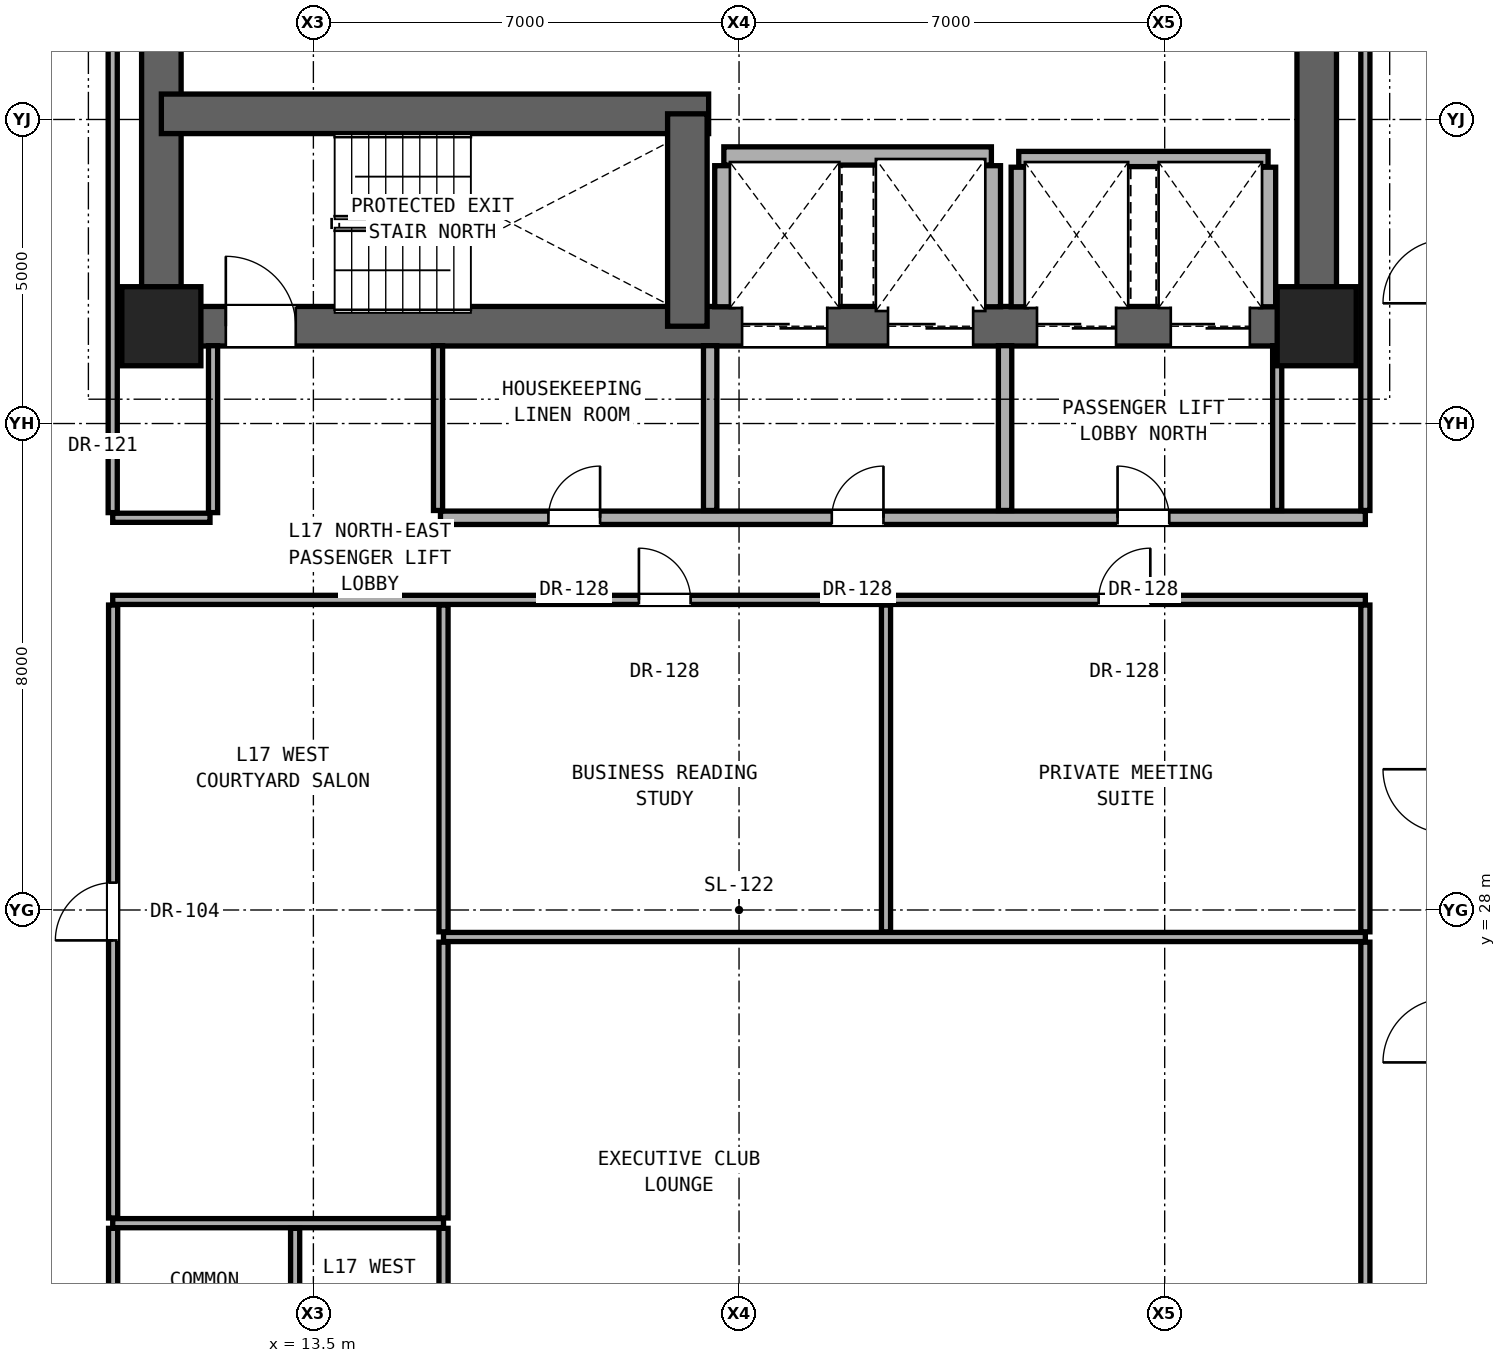
"""IFC4 building model, lengths in metres.
Left out: names, types, materials, properties, quantities, classifications, styles, units other than length and angle.
Written with IfcOpenShell. Run it as: python <this file> out.ifc"""

import sys

from ifc_helpers import new_model, si_unit, direction, frame, frame_2d, origin, origin_2d, place, context, subcontext, project, spatial, rectangle, extrude, element, fill, save


model = new_model("IFC4")
c1 = context("Model", 3, precision=1e-05, world=origin(), true_north=direction((0.0, 1.0)))
c2 = subcontext(c1, "Body", "Model", "MODEL_VIEW")
j1 = project(units=[si_unit("LENGTHUNIT", "METRE"), si_unit("PLANEANGLEUNIT", "RADIAN")], contexts=[c1])
p1 = place(None, origin())
s1 = spatial("IfcSite", under=j1, at=p1, CompositionType="ELEMENT")
p2 = place(p1, origin())
s2 = spatial("IfcBuilding", under=s1, at=p2, CompositionType="ELEMENT")
p3 = place(p2, frame((0.0, 0.0, 62.0)))
s3 = spatial("IfcBuildingStorey", under=s2, at=p3, CompositionType="ELEMENT", Elevation=62.0)
for number, where, z_axis, x_axis in (
    (1, (11.0, 37.6, 0.0), (0.0, 0.0, 1.0), (1.0, 0.0, 0.0)),
    (2, (30.0, 37.6, 0.0), (0.0, 0.0, 1.0), (1.0, 0.0, 0.0)),
):
    element("IfcColumn", number, at=place(p3, frame(where, z_axis=z_axis, x_axis=x_axis)), inside=s3, PredefinedType="COLUMN", context=c2, shape_type="SweptSolid", body=[
        extrude(rectangle(XDim=1.3, YDim=1.3, at=origin_2d()), origin(), (0.0, 0.0, 1.0), 3.3),
    ])
for number, where, z_axis, x_axis in (
    (3, (11.0, 37.6, 0.0), (0.0, 0.0, 1.0), (0.0, 1.0, 0.0)),
    (4, (30.0, 37.6, 0.0), (0.0, 0.0, 1.0), (0.0, 1.0, 0.0)),
):
    element("IfcWall", number, at=place(p3, frame(where, z_axis=z_axis, x_axis=x_axis)), inside=s3, PredefinedType="SHEAR", context=c2, shape_type="SweptSolid", body=[
        extrude(rectangle(XDim=6.0, YDim=0.65, at=frame_2d((3.0, 0.0))), origin(), (0.0, 0.0, 1.0), 3.06),
    ])
p4 = place(p3, frame((11.0, 37.6, 0.0), z_axis=(0.0, 0.0, 1.0), x_axis=(1.0, 0.0, 0.0)))
e5 = element("IfcWall", 5, at=p4, inside=s3, PredefinedType="SHEAR", context=c2, shape_type="SweptSolid", body=[
    extrude(rectangle(XDim=19.0, YDim=0.65, at=frame_2d((9.5, 0.0))), origin(), (0.0, 0.0, 1.0), 3.06),
])
p5 = place(p4, frame((1.06, 0.0, 0.0)))
e6 = element("IfcOpeningElement", 6, at=p5, cuts=e5, PredefinedType="OPENING", context=c2, shape_type="SweptSolid", body=[
    extrude(rectangle(XDim=1.15, YDim=2.2, at=frame_2d((0.575, 1.1))), frame((0.0, 0.335, 0.0), z_axis=(0.0, -1.0, 0.0), x_axis=(1.0, 0.0, 0.0)), (0.0, 0.0, 1.0), 0.67),
])
p6 = place(p4, frame((9.55, 0.0, 0.0)))
e7 = element("IfcOpeningElement", 7, at=p6, cuts=e5, PredefinedType="OPENING", context=c2, shape_type="SweptSolid", body=[
    extrude(rectangle(XDim=1.4, YDim=2.35, at=frame_2d((0.7, 1.175))), frame((0.0, 0.335, 0.0), z_axis=(0.0, -1.0, 0.0), x_axis=(1.0, 0.0, 0.0)), (0.0, 0.0, 1.0), 0.67),
])
p7 = place(p4, frame((11.95, 0.0, 0.0)))
e8 = element("IfcOpeningElement", 8, at=p7, cuts=e5, PredefinedType="OPENING", context=c2, shape_type="SweptSolid", body=[
    extrude(rectangle(XDim=1.4, YDim=2.35, at=frame_2d((0.7, 1.175))), frame((0.0, 0.335, 0.0), z_axis=(0.0, -1.0, 0.0), x_axis=(1.0, 0.0, 0.0)), (0.0, 0.0, 1.0), 0.67),
])
p8 = place(p4, frame((14.4, 0.0, 0.0)))
e9 = element("IfcOpeningElement", 9, at=p8, cuts=e5, PredefinedType="OPENING", context=c2, shape_type="SweptSolid", body=[
    extrude(rectangle(XDim=1.3, YDim=2.3, at=frame_2d((0.65, 1.15))), frame((0.0, 0.335, 0.0), z_axis=(0.0, -1.0, 0.0), x_axis=(1.0, 0.0, 0.0)), (0.0, 0.0, 1.0), 0.67),
])
p9 = place(p4, frame((16.6, 0.0, 0.0)))
e10 = element("IfcOpeningElement", 10, at=p9, cuts=e5, PredefinedType="OPENING", context=c2, shape_type="SweptSolid", body=[
    extrude(rectangle(XDim=1.3, YDim=2.3, at=frame_2d((0.65, 1.15))), frame((0.0, 0.335, 0.0), z_axis=(0.0, -1.0, 0.0), x_axis=(1.0, 0.0, 0.0)), (0.0, 0.0, 1.0), 0.67),
])
p10 = place(p3, frame((11.0, 41.093, 0.0), z_axis=(0.0, 0.0, 1.0), x_axis=(1.0, 0.0, 0.0)))
e11 = element("IfcWall", 11, at=p10, inside=s3, PredefinedType="SHEAR", context=c2, shape_type="SweptSolid", body=[
    extrude(rectangle(XDim=9.0, YDim=0.65, at=frame_2d((4.5, 0.0))), origin(), (0.0, 0.0, 1.0), 3.06),
])
p11 = place(p3, frame((19.65, 37.6, 0.0), z_axis=(0.0, 0.0, 1.0), x_axis=(0.0, 1.0, 0.0)))
e12 = element("IfcWall", 12, at=p11, inside=s3, PredefinedType="SHEAR", context=c2, shape_type="SweptSolid", body=[
    extrude(rectangle(XDim=3.493, YDim=0.65, at=frame_2d((1.747, 0.0))), origin(), (0.0, 0.0, 1.0), 3.06),
])
p12 = place(p3, frame((10.2, 22.85, 0.0), z_axis=(0.0, 0.0, 1.0), x_axis=(1.0, 0.0, 0.0)))
e13 = element("IfcWall", 13, at=p12, inside=s3, PredefinedType="PARTITIONING", context=c2, shape_type="SweptSolid", body=[
    extrude(rectangle(XDim=5.44, YDim=0.15, at=frame_2d((2.72, 0.0))), origin(), (0.0, 0.0, 1.0), 2.104),
])
p13 = place(p3, frame((15.64, 27.556, 0.0), z_axis=(0.0, 0.0, 1.0), x_axis=(1.0, 0.0, 0.0)))
e14 = element("IfcWall", 14, at=p13, inside=s3, PredefinedType="PARTITIONING", context=c2, shape_type="SweptSolid", body=[
    extrude(rectangle(XDim=15.16, YDim=0.15, at=frame_2d((7.58, 0.0))), origin(), (0.0, 0.0, 1.0), 2.104),
])
p14 = place(p3, frame((10.2, 33.1, 0.0), z_axis=(0.0, 0.0, 1.0), x_axis=(1.0, 0.0, 0.0)))
e15 = element("IfcWall", 15, at=p14, inside=s3, PredefinedType="PARTITIONING", context=c2, shape_type="SweptSolid", body=[
    extrude(rectangle(XDim=20.6, YDim=0.15, at=frame_2d((10.3, 0.0))), origin(), (0.0, 0.0, 1.0), 2.104),
])
p15 = place(p14, frame((8.654, 0.0, 0.0)))
e16 = element("IfcOpeningElement", 16, at=p15, cuts=e15, PredefinedType="OPENING", context=c2, shape_type="SweptSolid", body=[
    extrude(rectangle(XDim=0.85, YDim=2.01, at=frame_2d((0.425, 1.005))), frame((0.0, 0.085, 0.0), z_axis=(0.0, -1.0, 0.0), x_axis=(1.0, 0.0, 0.0)), (0.0, 0.0, 1.0), 0.17),
])
p16 = place(p14, frame((16.213, 0.0, 0.0)))
e17 = element("IfcOpeningElement", 17, at=p16, cuts=e15, PredefinedType="OPENING", context=c2, shape_type="SweptSolid", body=[
    extrude(rectangle(XDim=0.85, YDim=2.01, at=frame_2d((0.425, 1.005))), frame((0.0, 0.085, 0.0), z_axis=(0.0, -1.0, 0.0), x_axis=(1.0, 0.0, 0.0)), (0.0, 0.0, 1.0), 0.17),
])
p17 = place(p3, frame((10.2, 34.45, 0.0), z_axis=(0.0, 0.0, 1.0), x_axis=(1.0, 0.0, 0.0)))
e18 = element("IfcWall", 18, at=p17, inside=s3, PredefinedType="PARTITIONING", context=c2, shape_type="SweptSolid", body=[
    extrude(rectangle(XDim=1.6, YDim=0.15, at=frame_2d((0.8, 0.0))), origin(), (0.0, 0.0, 1.0), 2.104),
])
p18 = place(p3, frame((15.59, 34.45, 0.0), z_axis=(0.0, 0.0, 1.0), x_axis=(1.0, 0.0, 0.0)))
e19 = element("IfcWall", 19, at=p18, inside=s3, PredefinedType="SOLIDWALL", context=c2, shape_type="SweptSolid", body=[
    extrude(rectangle(XDim=15.21, YDim=0.22, at=frame_2d((7.605, 0.0))), origin(), (0.0, 0.0, 1.0), 2.104),
])
p19 = place(p18, frame((6.435, 0.0, 0.0)))
e20 = element("IfcOpeningElement", 20, at=p19, cuts=e19, PredefinedType="OPENING", context=c2, shape_type="SweptSolid", body=[
    extrude(rectangle(XDim=0.85, YDim=2.01, at=frame_2d((0.425, 1.005))), frame((0.0, 0.12, 0.0), z_axis=(0.0, -1.0, 0.0), x_axis=(1.0, 0.0, 0.0)), (0.0, 0.0, 1.0), 0.24),
])
p20 = place(p18, frame((11.135, 0.0, 0.0)))
e21 = element("IfcOpeningElement", 21, at=p20, cuts=e19, PredefinedType="OPENING", context=c2, shape_type="SweptSolid", body=[
    extrude(rectangle(XDim=0.85, YDim=2.01, at=frame_2d((0.425, 1.005))), frame((0.0, 0.12, 0.0), z_axis=(0.0, -1.0, 0.0), x_axis=(1.0, 0.0, 0.0)), (0.0, 0.0, 1.0), 0.24),
])
p21 = place(p18, frame((1.775, 0.0, 0.0)))
e22 = element("IfcOpeningElement", 22, at=p21, cuts=e19, PredefinedType="OPENING", context=c2, shape_type="SweptSolid", body=[
    extrude(rectangle(XDim=0.85, YDim=2.01, at=frame_2d((0.425, 1.005))), frame((0.0, 0.12, 0.0), z_axis=(0.0, -1.0, 0.0), x_axis=(1.0, 0.0, 0.0)), (0.0, 0.0, 1.0), 0.24),
])
p22 = place(p3, frame((25.1, 40.35, 0.0), z_axis=(0.0, 0.0, 1.0), x_axis=(1.0, 0.0, 0.0)))
e23 = element("IfcWall", 23, at=p22, inside=s3, PredefinedType="SOLIDWALL", context=c2, shape_type="SweptSolid", body=[
    extrude(rectangle(XDim=4.1, YDim=0.25, at=frame_2d((2.05, 0.0))), origin(), (0.0, 0.0, 1.0), 3.06),
])
p23 = place(p3, frame((20.25, 40.4, 0.0), z_axis=(0.0, 0.0, 1.0), x_axis=(1.0, 0.0, 0.0)))
e24 = element("IfcWall", 24, at=p23, inside=s3, PredefinedType="SOLIDWALL", context=c2, shape_type="SweptSolid", body=[
    extrude(rectangle(XDim=4.4, YDim=0.3, at=frame_2d((2.2, 0.0))), origin(), (0.0, 0.0, 1.0), 3.06),
])
p24 = place(p3, frame((10.207, 19.985, 0.0), z_axis=(0.0, 0.0, 1.0), x_axis=(0.0, 1.0, 0.0)))
e25 = element("IfcWall", 25, at=p24, inside=s3, PredefinedType="PARTITIONING", context=c2, shape_type="SweptSolid", body=[
    extrude(rectangle(XDim=2.78, YDim=0.15, at=frame_2d((1.39, 0.0))), origin(), (0.0, 0.0, 1.0), 3.06),
])
p25 = place(p3, frame((10.207, 22.935, 0.0), z_axis=(0.0, 0.0, 1.0), x_axis=(0.0, 1.0, 0.0)))
e26 = element("IfcWall", 26, at=p25, inside=s3, PredefinedType="PARTITIONING", context=c2, shape_type="SweptSolid", body=[
    extrude(rectangle(XDim=10.08, YDim=0.15, at=frame_2d((5.04, 0.0))), origin(), (0.0, 0.0, 1.0), 2.279),
])
p26 = place(p25, frame((4.565, 0.0, 0.0)))
e27 = element("IfcOpeningElement", 27, at=p26, cuts=e26, PredefinedType="OPENING", context=c2, shape_type="SweptSolid", body=[
    extrude(rectangle(XDim=0.95, YDim=2.15, at=frame_2d((0.475, 1.075))), frame((0.0, 0.085, 0.0), z_axis=(0.0, -1.0, 0.0), x_axis=(1.0, 0.0, 0.0)), (0.0, 0.0, 1.0), 0.17),
])
p27 = place(p3, frame((10.2, 34.535, 0.0), z_axis=(0.0, 0.0, 1.0), x_axis=(0.0, 1.0, 0.0)))
e28 = element("IfcWall", 28, at=p27, inside=s3, PredefinedType="PARTITIONING", context=c2, shape_type="SweptSolid", body=[
    extrude(rectangle(XDim=9.13, YDim=0.15, at=frame_2d((4.565, 0.0))), origin(), (0.0, 0.0, 1.0), 2.436),
])
p28 = place(p3, frame((11.85, 34.535, 0.0), z_axis=(0.0, 0.0, 1.0), x_axis=(0.0, 1.0, 0.0)))
e29 = element("IfcWall", 29, at=p28, inside=s3, PredefinedType="PARTITIONING", context=c2, shape_type="SweptSolid", body=[
    extrude(rectangle(XDim=2.745, YDim=0.15, at=frame_2d((1.373, 0.0))), origin(), (0.0, 0.0, 1.0), 3.06),
])
p29 = place(p3, frame((13.2, 19.985, 0.0), z_axis=(0.0, 0.0, 1.0), x_axis=(0.0, 1.0, 0.0)))
e30 = element("IfcWall", 30, at=p29, inside=s3, PredefinedType="PARTITIONING", context=c2, shape_type="SweptSolid", body=[
    extrude(rectangle(XDim=2.78, YDim=0.15, at=frame_2d((1.39, 0.0))), origin(), (0.0, 0.0, 1.0), 3.06),
])
p30 = place(p3, frame((15.64, 19.985, 0.0), z_axis=(0.0, 0.0, 1.0), x_axis=(0.0, 1.0, 0.0)))
e31 = element("IfcWall", 31, at=p30, inside=s3, PredefinedType="PARTITIONING", context=c2, shape_type="SweptSolid", body=[
    extrude(rectangle(XDim=2.78, YDim=0.15, at=frame_2d((1.39, 0.0))), origin(), (0.0, 0.0, 1.0), 2.589),
])
p31 = place(p3, frame((15.64, 22.935, 0.0), z_axis=(0.0, 0.0, 1.0), x_axis=(0.0, 1.0, 0.0)))
e32 = element("IfcWall", 32, at=p31, inside=s3, PredefinedType="PARTITIONING", context=c2, shape_type="SweptSolid", body=[
    extrude(rectangle(XDim=4.536, YDim=0.15, at=frame_2d((2.268, 0.0))), origin(), (0.0, 0.0, 1.0), 2.104),
])
p32 = place(p3, frame((15.64, 27.641, 0.0), z_axis=(0.0, 0.0, 1.0), x_axis=(0.0, 1.0, 0.0)))
e33 = element("IfcWall", 33, at=p32, inside=s3, PredefinedType="PARTITIONING", context=c2, shape_type="SweptSolid", body=[
    extrude(rectangle(XDim=5.374, YDim=0.15, at=frame_2d((2.687, 0.0))), origin(), (0.0, 0.0, 1.0), 2.104),
])
p33 = place(p3, frame((15.55, 34.57, 0.0), z_axis=(0.0, 0.0, 1.0), x_axis=(0.0, 1.0, 0.0)))
e34 = element("IfcWall", 34, at=p33, inside=s3, PredefinedType="PARTITIONING", context=c2, shape_type="SweptSolid", body=[
    extrude(rectangle(XDim=2.71, YDim=0.15, at=frame_2d((1.355, 0.0))), origin(), (0.0, 0.0, 1.0), 2.589),
])
p34 = place(p3, frame((20.025, 34.57, 0.0), z_axis=(0.0, 0.0, 1.0), x_axis=(0.0, 1.0, 0.0)))
e35 = element("IfcWall", 35, at=p34, inside=s3, PredefinedType="SOLIDWALL", context=c2, shape_type="SweptSolid", body=[
    extrude(rectangle(XDim=2.71, YDim=0.22, at=frame_2d((1.355, 0.0))), origin(), (0.0, 0.0, 1.0), 3.06),
])
p35 = place(p3, frame((20.25, 37.92, 0.0), z_axis=(0.0, 0.0, 1.0), x_axis=(0.0, 1.0, 0.0)))
e36 = element("IfcWall", 36, at=p35, inside=s3, PredefinedType="SOLIDWALL", context=c2, shape_type="SweptSolid", body=[
    extrude(rectangle(XDim=2.32, YDim=0.3, at=frame_2d((1.16, 0.0))), origin(), (0.0, 0.0, 1.0), 3.06),
])
p36 = place(p3, frame((22.917, 27.641, 0.0), z_axis=(0.0, 0.0, 1.0), x_axis=(0.0, 1.0, 0.0)))
e37 = element("IfcWall", 37, at=p36, inside=s3, PredefinedType="PARTITIONING", context=c2, shape_type="SweptSolid", body=[
    extrude(rectangle(XDim=5.374, YDim=0.15, at=frame_2d((2.687, 0.0))), origin(), (0.0, 0.0, 1.0), 2.104),
])
p37 = place(p3, frame((24.65, 37.92, 0.0), z_axis=(0.0, 0.0, 1.0), x_axis=(0.0, 1.0, 0.0)))
e38 = element("IfcWall", 38, at=p37, inside=s3, PredefinedType="SOLIDWALL", context=c2, shape_type="SweptSolid", body=[
    extrude(rectangle(XDim=2.32, YDim=0.3, at=frame_2d((1.16, 0.0))), origin(), (0.0, 0.0, 1.0), 3.06),
])
p38 = place(p3, frame((24.875, 34.57, 0.0), z_axis=(0.0, 0.0, 1.0), x_axis=(0.0, 1.0, 0.0)))
e39 = element("IfcWall", 39, at=p38, inside=s3, PredefinedType="SOLIDWALL", context=c2, shape_type="SweptSolid", body=[
    extrude(rectangle(XDim=2.71, YDim=0.22, at=frame_2d((1.355, 0.0))), origin(), (0.0, 0.0, 1.0), 3.06),
])
p39 = place(p3, frame((25.1, 37.92, 0.0), z_axis=(0.0, 0.0, 1.0), x_axis=(0.0, 1.0, 0.0)))
e40 = element("IfcWall", 40, at=p39, inside=s3, PredefinedType="SOLIDWALL", context=c2, shape_type="SweptSolid", body=[
    extrude(rectangle(XDim=2.295, YDim=0.25, at=frame_2d((1.147, 0.0))), origin(), (0.0, 0.0, 1.0), 3.06),
])
p40 = place(p3, frame((29.35, 34.57, 0.0), z_axis=(0.0, 0.0, 1.0), x_axis=(0.0, 1.0, 0.0)))
e41 = element("IfcWall", 41, at=p40, inside=s3, PredefinedType="PARTITIONING", context=c2, shape_type="SweptSolid", body=[
    extrude(rectangle(XDim=2.71, YDim=0.15, at=frame_2d((1.355, 0.0))), origin(), (0.0, 0.0, 1.0), 3.06),
])
p41 = place(p3, frame((29.2, 37.92, 0.0), z_axis=(0.0, 0.0, 1.0), x_axis=(0.0, 1.0, 0.0)))
e42 = element("IfcWall", 42, at=p41, inside=s3, PredefinedType="SOLIDWALL", context=c2, shape_type="SweptSolid", body=[
    extrude(rectangle(XDim=2.295, YDim=0.25, at=frame_2d((1.147, 0.0))), origin(), (0.0, 0.0, 1.0), 3.06),
])
p42 = place(p3, frame((30.8, 19.985, 0.0), z_axis=(0.0, 0.0, 1.0), x_axis=(0.0, 1.0, 0.0)))
e43 = element("IfcWall", 43, at=p42, inside=s3, PredefinedType="PARTITIONING", context=c2, shape_type="SweptSolid", body=[
    extrude(rectangle(XDim=7.486, YDim=0.15, at=frame_2d((3.743, 0.0))), origin(), (0.0, 0.0, 1.0), 2.279),
])
p43 = place(p3, frame((30.8, 27.641, 0.0), z_axis=(0.0, 0.0, 1.0), x_axis=(0.0, 1.0, 0.0)))
e44 = element("IfcWall", 44, at=p43, inside=s3, PredefinedType="PARTITIONING", context=c2, shape_type="SweptSolid", body=[
    extrude(rectangle(XDim=5.374, YDim=0.15, at=frame_2d((2.687, 0.0))), origin(), (0.0, 0.0, 1.0), 2.279),
])
p44 = place(p3, frame((30.8, 34.57, 0.0), z_axis=(0.0, 0.0, 1.0), x_axis=(0.0, 1.0, 0.0)))
e45 = element("IfcWall", 45, at=p44, inside=s3, PredefinedType="PARTITIONING", context=c2, shape_type="SweptSolid", body=[
    extrude(rectangle(XDim=9.095, YDim=0.15, at=frame_2d((4.547, 0.0))), origin(), (0.0, 0.0, 1.0), 2.436),
])
p45 = place(p5, origin())
e46 = element("IfcDoor", 46, at=p45, inside=s3, OperationType="SINGLE_SWING_LEFT", PredefinedType="DOOR", context=c2, shape_type="SweptSolid", body=[
    extrude(rectangle(XDim=1.15, YDim=2.2, at=frame_2d((0.575, 1.1))), frame((0.0, 0.025, 0.0), z_axis=(0.0, -1.0, 0.0), x_axis=(1.0, 0.0, 0.0)), (0.0, 0.0, 1.0), 0.05),
])
fill(e6, e46)
p46 = place(p19, origin())
e47 = element("IfcDoor", 47, at=p46, inside=s3, OperationType="SINGLE_SWING_RIGHT", PredefinedType="DOOR", context=c2, shape_type="SweptSolid", body=[
    extrude(rectangle(XDim=0.85, YDim=2.01, at=frame_2d((0.425, 1.005))), frame((0.0, 0.025, 0.0), z_axis=(0.0, -1.0, 0.0), x_axis=(1.0, 0.0, 0.0)), (0.0, 0.0, 1.0), 0.05),
])
fill(e20, e47)
p47 = place(p20, origin())
e48 = element("IfcDoor", 48, at=p47, inside=s3, OperationType="SINGLE_SWING_LEFT", PredefinedType="DOOR", context=c2, shape_type="SweptSolid", body=[
    extrude(rectangle(XDim=0.85, YDim=2.01, at=frame_2d((0.425, 1.005))), frame((0.0, 0.025, 0.0), z_axis=(0.0, -1.0, 0.0), x_axis=(1.0, 0.0, 0.0)), (0.0, 0.0, 1.0), 0.05),
])
fill(e21, e48)
p48 = place(p21, origin())
e49 = element("IfcDoor", 49, at=p48, inside=s3, OperationType="SINGLE_SWING_RIGHT", PredefinedType="DOOR", context=c2, shape_type="SweptSolid", body=[
    extrude(rectangle(XDim=0.85, YDim=2.01, at=frame_2d((0.425, 1.005))), frame((0.0, 0.025, 0.0), z_axis=(0.0, -1.0, 0.0), x_axis=(1.0, 0.0, 0.0)), (0.0, 0.0, 1.0), 0.05),
])
fill(e22, e49)
p49 = place(p26, origin())
e50 = element("IfcDoor", 50, at=p49, inside=s3, OperationType="SINGLE_SWING_LEFT", PredefinedType="DOOR", context=c2, shape_type="SweptSolid", body=[
    extrude(rectangle(XDim=0.95, YDim=2.15, at=frame_2d((0.475, 1.075))), frame((0.0, 0.025, 0.0), z_axis=(0.0, -1.0, 0.0), x_axis=(1.0, 0.0, 0.0)), (0.0, 0.0, 1.0), 0.05),
])
fill(e27, e50)
p50 = place(p15, origin())
e51 = element("IfcDoor", 51, at=p50, inside=s3, OperationType="SINGLE_SWING_LEFT", PredefinedType="DOOR", context=c2, shape_type="SweptSolid", body=[
    extrude(rectangle(XDim=0.85, YDim=2.01, at=frame_2d((0.425, 1.005))), frame((0.0, 0.025, 0.0), z_axis=(0.0, -1.0, 0.0), x_axis=(1.0, 0.0, 0.0)), (0.0, 0.0, 1.0), 0.05),
])
fill(e16, e51)
p51 = place(p16, origin())
e52 = element("IfcDoor", 52, at=p51, inside=s3, OperationType="SINGLE_SWING_RIGHT", PredefinedType="DOOR", context=c2, shape_type="SweptSolid", body=[
    extrude(rectangle(XDim=0.85, YDim=2.01, at=frame_2d((0.425, 1.005))), frame((0.0, 0.025, 0.0), z_axis=(0.0, -1.0, 0.0), x_axis=(1.0, 0.0, 0.0)), (0.0, 0.0, 1.0), 0.05),
])
fill(e17, e52)
p52 = place(p6, origin())
e53 = element("IfcDoor", 53, at=p52, inside=s3, OperationType="DOUBLE_DOOR_SLIDING", PredefinedType="DOOR", context=c2, shape_type="SweptSolid", body=[
    extrude(rectangle(XDim=1.4, YDim=2.35, at=frame_2d((0.7, 1.175))), frame((0.0, 0.025, 0.0), z_axis=(0.0, -1.0, 0.0), x_axis=(1.0, 0.0, 0.0)), (0.0, 0.0, 1.0), 0.05),
])
fill(e7, e53)
p53 = place(p7, origin())
e54 = element("IfcDoor", 54, at=p53, inside=s3, OperationType="DOUBLE_DOOR_SLIDING", PredefinedType="DOOR", context=c2, shape_type="SweptSolid", body=[
    extrude(rectangle(XDim=1.4, YDim=2.35, at=frame_2d((0.7, 1.175))), frame((0.0, 0.025, 0.0), z_axis=(0.0, -1.0, 0.0), x_axis=(1.0, 0.0, 0.0)), (0.0, 0.0, 1.0), 0.05),
])
fill(e8, e54)
p54 = place(p8, origin())
e55 = element("IfcDoor", 55, at=p54, inside=s3, OperationType="DOUBLE_DOOR_SLIDING", PredefinedType="DOOR", context=c2, shape_type="SweptSolid", body=[
    extrude(rectangle(XDim=1.3, YDim=2.3, at=frame_2d((0.65, 1.15))), frame((0.0, 0.025, 0.0), z_axis=(0.0, -1.0, 0.0), x_axis=(1.0, 0.0, 0.0)), (0.0, 0.0, 1.0), 0.05),
])
fill(e9, e55)
p55 = place(p9, origin())
e56 = element("IfcDoor", 56, at=p55, inside=s3, OperationType="DOUBLE_DOOR_SLIDING", PredefinedType="DOOR", context=c2, shape_type="SweptSolid", body=[
    extrude(rectangle(XDim=1.3, YDim=2.3, at=frame_2d((0.65, 1.15))), frame((0.0, 0.025, 0.0), z_axis=(0.0, -1.0, 0.0), x_axis=(1.0, 0.0, 0.0)), (0.0, 0.0, 1.0), 0.05),
])
fill(e10, e56)
save(model, sys.argv[1])
